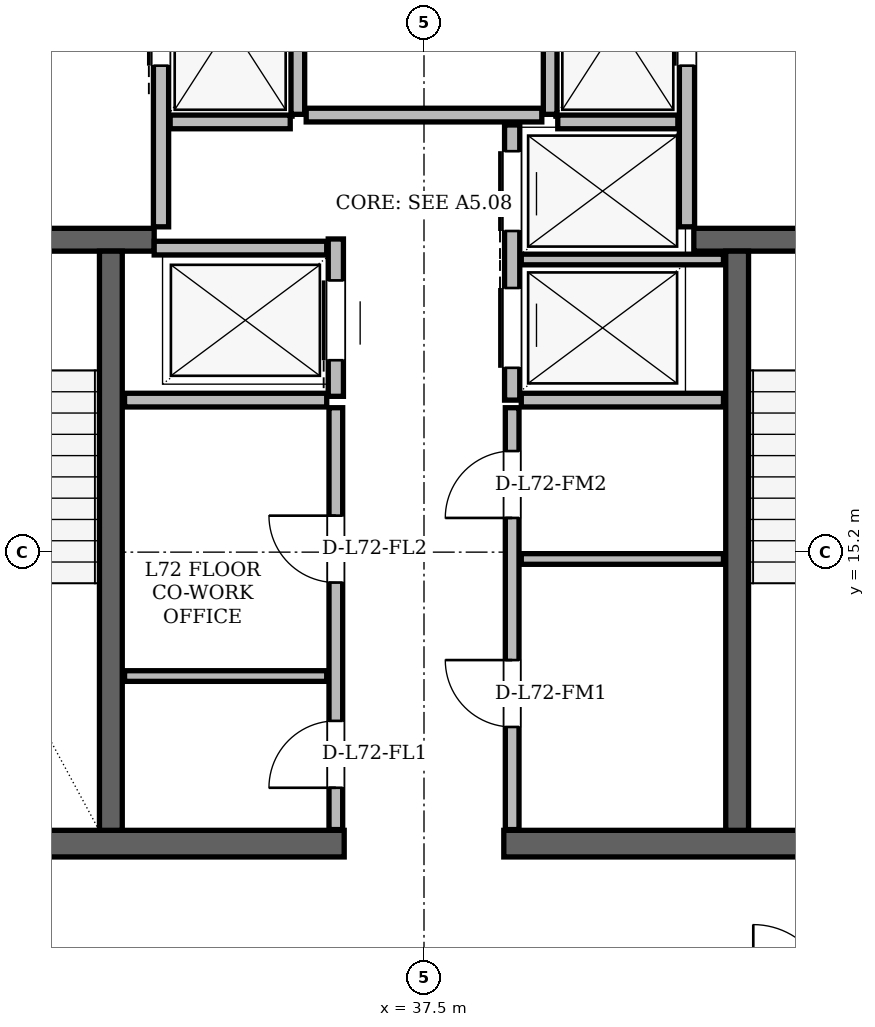
"""IFC4 building model, lengths in metres.
Left out: names, types, materials, properties, quantities, classifications, styles, units other than length and angle.
Written with IfcOpenShell. Run it as: python <this file> out.ifc"""

import sys

from ifc_helpers import new_model, si_unit, direction, frame, frame_2d, origin, place, context, subcontext, project, spatial, rectangle, extrude, element, fill, save


model = new_model("IFC4")
c1 = context("Model", 3, precision=1e-05, world=origin(), true_north=direction((0.0, 1.0)))
c2 = subcontext(c1, "Body", "Model", "MODEL_VIEW")
j1 = project(units=[si_unit("LENGTHUNIT", "METRE"), si_unit("PLANEANGLEUNIT", "RADIAN")], contexts=[c1])
p1 = place(None, origin())
s1 = spatial("IfcSite", under=j1, at=p1, CompositionType="ELEMENT")
p2 = place(p1, origin())
s2 = spatial("IfcBuilding", under=s1, at=p2, CompositionType="ELEMENT")
p3 = place(p2, frame((0.0, 0.0, 273.3)))
s3 = spatial("IfcBuildingStorey", under=s2, at=p3, CompositionType="ELEMENT", Elevation=273.3)
for number, where, z_axis, x_axis in (
    (1, (29.35, 11.365, 0.0), (0.0, 0.0, 1.0), (1.0, 0.0, 0.0)),
    (2, (38.55, 11.365, 0.0), (0.0, 0.0, 1.0), (1.0, 0.0, 0.0)),
):
    element("IfcWall", number, at=place(p3, frame(where, z_axis=z_axis, x_axis=x_axis)), inside=s3, PredefinedType="SHEAR", context=c2, shape_type="SweptSolid", body=[
        extrude(rectangle(XDim=7.1, YDim=0.35, at=frame_2d((3.55, 0.0))), origin(), (0.0, 0.0, 1.0), 3.68),
    ])
p4 = place(p3, frame((29.94, 19.31, 0.0), z_axis=(0.0, 0.0, 1.0), x_axis=(1.0, 0.0, 0.0)))
e3 = element("IfcWall", 3, at=p4, inside=s3, PredefinedType="SHEAR", context=c2, shape_type="SweptSolid", body=[
    extrude(rectangle(XDim=4.01, YDim=0.3, at=frame_2d((2.005, 0.0))), origin(), (0.0, 0.0, 1.0), 3.68),
])
p5 = place(p4, frame((1.01, 0.0, 0.0)))
e4 = element("IfcOpeningElement", 4, at=p5, cuts=e3, PredefinedType="OPENING", context=c2, shape_type="SweptSolid", body=[
    extrude(rectangle(XDim=1.4, YDim=2.2, at=frame_2d((0.7, 1.1))), frame((0.0, 0.15, 0.0), z_axis=(0.0, -1.0, 0.0), x_axis=(1.0, 0.0, 0.0)), (0.0, 0.0, 1.0), 0.3),
])
p6 = place(p3, frame((41.05, 19.31, 0.0), z_axis=(0.0, 0.0, 1.0), x_axis=(1.0, 0.0, 0.0)))
e5 = element("IfcWall", 5, at=p6, inside=s3, PredefinedType="SHEAR", context=c2, shape_type="SweptSolid", body=[
    extrude(rectangle(XDim=4.01, YDim=0.3, at=frame_2d((2.005, 0.0))), origin(), (0.0, 0.0, 1.0), 3.68),
])
p7 = place(p6, frame((1.6, 0.0, 0.0)))
e6 = element("IfcOpeningElement", 6, at=p7, cuts=e5, PredefinedType="OPENING", context=c2, shape_type="SweptSolid", body=[
    extrude(rectangle(XDim=1.4, YDim=2.2, at=frame_2d((0.7, 1.1))), frame((0.0, 0.15, 0.0), z_axis=(0.0, -1.0, 0.0), x_axis=(1.0, 0.0, 0.0)), (0.0, 0.0, 1.0), 0.3),
])
for number, where, z_axis, x_axis in (
    (7, (33.38, 11.54, 0.0), (0.0, 0.0, 1.0), (0.0, 1.0, 0.0)),
    (8, (41.62, 11.54, 0.0), (0.0, 0.0, 1.0), (0.0, 1.0, 0.0)),
):
    element("IfcWall", number, at=place(p3, frame(where, z_axis=z_axis, x_axis=x_axis)), inside=s3, PredefinedType="SHEAR", context=c2, shape_type="SweptSolid", body=[
        extrude(rectangle(XDim=7.62, YDim=0.3, at=frame_2d((3.81, 0.0))), origin(), (0.0, 0.0, 1.0), 3.68),
    ])
p8 = place(p3, frame((58.532, 10.683, 0.0), z_axis=(0.0, 0.0, 1.0), x_axis=(-0.499999381892, 0.866025760649, 0.0)))
e9 = element("IfcWall", 9, at=p8, inside=s3, PredefinedType="SOLIDWALL", context=c2, shape_type="SweptSolid", body=[
    extrude(rectangle(XDim=37.343, YDim=0.29, at=frame_2d((18.671, 0.0))), origin(), (0.0, 0.0, 1.0), 3.058),
])
p9 = place(p8, frame((6.789, 0.0, 0.0)))
e10 = element("IfcOpeningElement", 10, at=p9, cuts=e9, PredefinedType="OPENING", context=c2, shape_type="SweptSolid", body=[
    extrude(rectangle(XDim=1.5, YDim=2.2, at=frame_2d((0.75, 1.1))), frame((0.0, 0.145, 0.0), z_axis=(0.0, -1.0, 0.0), x_axis=(1.0, 0.0, 0.0)), (0.0, 0.0, 1.0), 0.29),
])
p10 = place(p8, frame((27.808, 0.0, 0.0)))
e11 = element("IfcOpeningElement", 11, at=p10, cuts=e9, PredefinedType="OPENING", context=c2, shape_type="SweptSolid", body=[
    extrude(rectangle(XDim=1.5, YDim=2.2, at=frame_2d((0.75, 1.1))), frame((0.0, 0.145, 0.0), z_axis=(0.0, -1.0, 0.0), x_axis=(1.0, 0.0, 0.0)), (0.0, 0.0, 1.0), 0.29),
])
p11 = place(p8, frame((0.901, 0.0, 0.85)))
e12 = element("IfcOpeningElement", 12, at=p11, cuts=e9, PredefinedType="OPENING", context=c2, shape_type="SweptSolid", body=[
    extrude(rectangle(XDim=1.2, YDim=1.48, at=frame_2d((0.6, 0.74))), frame((0.0, 0.145, 0.0), z_axis=(0.0, -1.0, 0.0), x_axis=(1.0, 0.0, 0.0)), (0.0, 0.0, 1.0), 0.29),
])
p12 = place(p8, frame((12.688, 0.0, 0.85)))
e13 = element("IfcOpeningElement", 13, at=p12, cuts=e9, PredefinedType="OPENING", context=c2, shape_type="SweptSolid", body=[
    extrude(rectangle(XDim=3.0, YDim=2.098, at=frame_2d((1.5, 1.049))), frame((0.0, 0.145, 0.0), z_axis=(0.0, -1.0, 0.0), x_axis=(1.0, 0.0, 0.0)), (0.0, 0.0, 1.0), 0.29),
])
p13 = place(p8, frame((17.814, 0.0, 0.85)))
e14 = element("IfcOpeningElement", 14, at=p13, cuts=e9, PredefinedType="OPENING", context=c2, shape_type="SweptSolid", body=[
    extrude(rectangle(XDim=2.6, YDim=1.95, at=frame_2d((1.3, 0.975))), frame((0.0, 0.145, 0.0), z_axis=(0.0, -1.0, 0.0), x_axis=(1.0, 0.0, 0.0)), (0.0, 0.0, 1.0), 0.29),
])
p14 = place(p8, frame((35.362, 0.0, 0.85)))
e15 = element("IfcOpeningElement", 15, at=p14, cuts=e9, PredefinedType="OPENING", context=c2, shape_type="SweptSolid", body=[
    extrude(rectangle(XDim=1.2, YDim=1.48, at=frame_2d((0.6, 0.74))), frame((0.0, 0.145, 0.0), z_axis=(0.0, -1.0, 0.0), x_axis=(1.0, 0.0, 0.0)), (0.0, 0.0, 1.0), 0.29),
])
p15 = place(p8, frame((33.788, 0.0, 0.85)))
e16 = element("IfcOpeningElement", 16, at=p15, cuts=e9, PredefinedType="OPENING", context=c2, shape_type="SweptSolid", body=[
    extrude(rectangle(XDim=1.2, YDim=1.48, at=frame_2d((0.6, 0.74))), frame((0.0, 0.145, 0.0), z_axis=(0.0, -1.0, 0.0), x_axis=(1.0, 0.0, 0.0)), (0.0, 0.0, 1.0), 0.29),
])
p16 = place(p8, frame((22.74, 0.0, 0.85)))
e17 = element("IfcOpeningElement", 17, at=p16, cuts=e9, PredefinedType="OPENING", context=c2, shape_type="SweptSolid", body=[
    extrude(rectangle(XDim=1.2, YDim=1.48, at=frame_2d((0.6, 0.74))), frame((0.0, 0.145, 0.0), z_axis=(0.0, -1.0, 0.0), x_axis=(1.0, 0.0, 0.0)), (0.0, 0.0, 1.0), 0.29),
])
p17 = place(p8, frame((31.705, 0.0, 0.85)))
e18 = element("IfcOpeningElement", 18, at=p17, cuts=e9, PredefinedType="OPENING", context=c2, shape_type="SweptSolid", body=[
    extrude(rectangle(XDim=1.2, YDim=1.48, at=frame_2d((0.6, 0.74))), frame((0.0, 0.145, 0.0), z_axis=(0.0, -1.0, 0.0), x_axis=(1.0, 0.0, 0.0)), (0.0, 0.0, 1.0), 0.29),
])
p18 = place(p3, frame((35.139, 43.023, 0.0), z_axis=(0.0, 0.0, 1.0), x_axis=(-0.499999381892, -0.866025760649, 0.0)))
e19 = element("IfcWall", 19, at=p18, inside=s3, PredefinedType="SOLIDWALL", context=c2, shape_type="SweptSolid", body=[
    extrude(rectangle(XDim=37.343, YDim=0.29, at=frame_2d((18.671, 0.0))), origin(), (0.0, 0.0, 1.0), 3.058),
])
p19 = place(p18, frame((3.639, 0.0, 0.0)))
e20 = element("IfcOpeningElement", 20, at=p19, cuts=e19, PredefinedType="OPENING", context=c2, shape_type="SweptSolid", body=[
    extrude(rectangle(XDim=1.5, YDim=2.2, at=frame_2d((0.75, 1.1))), frame((0.0, 0.145, 0.0), z_axis=(0.0, -1.0, 0.0), x_axis=(1.0, 0.0, 0.0)), (0.0, 0.0, 1.0), 0.29),
])
p20 = place(p18, frame((27.809, 0.0, 0.0)))
e21 = element("IfcOpeningElement", 21, at=p20, cuts=e19, PredefinedType="OPENING", context=c2, shape_type="SweptSolid", body=[
    extrude(rectangle(XDim=1.5, YDim=2.2, at=frame_2d((0.75, 1.1))), frame((0.0, 0.145, 0.0), z_axis=(0.0, -1.0, 0.0), x_axis=(1.0, 0.0, 0.0)), (0.0, 0.0, 1.0), 0.29),
])
p21 = place(p18, frame((22.281, 0.0, 0.85)))
e22 = element("IfcOpeningElement", 22, at=p21, cuts=e19, PredefinedType="OPENING", context=c2, shape_type="SweptSolid", body=[
    extrude(rectangle(XDim=2.6, YDim=1.95, at=frame_2d((1.3, 0.975))), frame((0.0, 0.145, 0.0), z_axis=(0.0, -1.0, 0.0), x_axis=(1.0, 0.0, 0.0)), (0.0, 0.0, 1.0), 0.29),
])
p22 = place(p18, frame((33.866, 0.0, 0.85)))
e23 = element("IfcOpeningElement", 23, at=p22, cuts=e19, PredefinedType="OPENING", context=c2, shape_type="SweptSolid", body=[
    extrude(rectangle(XDim=2.4, YDim=1.9, at=frame_2d((1.2, 0.95))), frame((0.0, 0.145, 0.0), z_axis=(0.0, -1.0, 0.0), x_axis=(1.0, 0.0, 0.0)), (0.0, 0.0, 1.0), 0.29),
])
p23 = place(p18, frame((12.197, 0.0, 0.85)))
e24 = element("IfcOpeningElement", 24, at=p23, cuts=e19, PredefinedType="OPENING", context=c2, shape_type="SweptSolid", body=[
    extrude(rectangle(XDim=1.2, YDim=1.48, at=frame_2d((0.6, 0.74))), frame((0.0, 0.145, 0.0), z_axis=(0.0, -1.0, 0.0), x_axis=(1.0, 0.0, 0.0)), (0.0, 0.0, 1.0), 0.29),
])
p24 = place(p18, frame((16.635, 0.0, 0.85)))
e25 = element("IfcOpeningElement", 25, at=p24, cuts=e19, PredefinedType="OPENING", context=c2, shape_type="SweptSolid", body=[
    extrude(rectangle(XDim=1.6, YDim=1.7, at=frame_2d((0.8, 0.85))), frame((0.0, 0.145, 0.0), z_axis=(0.0, -1.0, 0.0), x_axis=(1.0, 0.0, 0.0)), (0.0, 0.0, 1.0), 0.29),
])
p25 = place(p18, frame((7.001, 0.0, 0.85)))
e26 = element("IfcOpeningElement", 26, at=p25, cuts=e19, PredefinedType="OPENING", context=c2, shape_type="SweptSolid", body=[
    extrude(rectangle(XDim=1.2, YDim=1.48, at=frame_2d((0.6, 0.74))), frame((0.0, 0.145, 0.0), z_axis=(0.0, -1.0, 0.0), x_axis=(1.0, 0.0, 0.0)), (0.0, 0.0, 1.0), 0.29),
])
p26 = place(p3, frame((34.04, 19.48, 0.0), z_axis=(0.0, 0.0, 1.0), x_axis=(0.0, 1.0, 0.0)))
e27 = element("IfcWall", 27, at=p26, inside=s3, PredefinedType="PARTITIONING", context=c2, shape_type="SweptSolid", body=[
    extrude(rectangle(XDim=4.5, YDim=0.2, at=frame_2d((2.25, 0.0))), origin(), (0.0, 0.0, 1.0), 3.68),
])
p27 = place(p26, frame((2.12, 0.0, 0.0)))
e28 = element("IfcOpeningElement", 28, at=p27, cuts=e27, PredefinedType="OPENING", context=c2, shape_type="SweptSolid", body=[
    extrude(rectangle(XDim=1.1, YDim=2.2, at=frame_2d((0.55, 1.1))), frame((0.0, 0.1, 0.0), z_axis=(0.0, -1.0, 0.0), x_axis=(1.0, 0.0, 0.0)), (0.0, 0.0, 1.0), 0.2),
])
p28 = place(p3, frame((35.84, 20.96, 0.0), z_axis=(0.0, 0.0, 1.0), x_axis=(0.0, 1.0, 0.0)))
e29 = element("IfcWall", 29, at=p28, inside=s3, PredefinedType="PARTITIONING", context=c2, shape_type="SweptSolid", body=[
    extrude(rectangle(XDim=3.02, YDim=0.18, at=frame_2d((1.51, 0.0))), origin(), (0.0, 0.0, 1.0), 3.68),
])
p29 = place(p3, frame((34.16, 20.86, 0.0), z_axis=(0.0, 0.0, 1.0), x_axis=(1.0, 0.0, 0.0)))
e30 = element("IfcWall", 30, at=p29, inside=s3, PredefinedType="PARTITIONING", context=c2, shape_type="SweptSolid", body=[
    extrude(rectangle(XDim=1.58, YDim=0.18, at=frame_2d((0.79, 0.0))), origin(), (0.0, 0.0, 1.0), 3.68),
])
p30 = place(p3, frame((40.96, 19.48, 0.0), z_axis=(0.0, 0.0, 1.0), x_axis=(0.0, 1.0, 0.0)))
e31 = element("IfcWall", 31, at=p30, inside=s3, PredefinedType="PARTITIONING", context=c2, shape_type="SweptSolid", body=[
    extrude(rectangle(XDim=4.5, YDim=0.2, at=frame_2d((2.25, 0.0))), origin(), (0.0, 0.0, 1.0), 3.68),
])
p31 = place(p30, frame((2.12, 0.0, 0.0)))
e32 = element("IfcOpeningElement", 32, at=p31, cuts=e31, PredefinedType="OPENING", context=c2, shape_type="SweptSolid", body=[
    extrude(rectangle(XDim=1.1, YDim=2.2, at=frame_2d((0.55, 1.1))), frame((0.0, 0.1, 0.0), z_axis=(0.0, -1.0, 0.0), x_axis=(1.0, 0.0, 0.0)), (0.0, 0.0, 1.0), 0.2),
])
p32 = place(p3, frame((39.16, 20.96, 0.0), z_axis=(0.0, 0.0, 1.0), x_axis=(0.0, 1.0, 0.0)))
e33 = element("IfcWall", 33, at=p32, inside=s3, PredefinedType="PARTITIONING", context=c2, shape_type="SweptSolid", body=[
    extrude(rectangle(XDim=3.02, YDim=0.18, at=frame_2d((1.51, 0.0))), origin(), (0.0, 0.0, 1.0), 3.68),
])
p33 = place(p3, frame((39.26, 20.86, 0.0), z_axis=(0.0, 0.0, 1.0), x_axis=(1.0, 0.0, 0.0)))
e34 = element("IfcWall", 34, at=p33, inside=s3, PredefinedType="PARTITIONING", context=c2, shape_type="SweptSolid", body=[
    extrude(rectangle(XDim=1.58, YDim=0.18, at=frame_2d((0.79, 0.0))), origin(), (0.0, 0.0, 1.0), 3.68),
])
p34 = place(p3, frame((36.34, 17.25, 0.0), z_axis=(0.0, 0.0, 1.0), x_axis=(0.0, 1.0, 0.0)))
e35 = element("IfcWall", 35, at=p34, inside=s3, PredefinedType="PARTITIONING", context=c2, shape_type="SweptSolid", body=[
    extrude(rectangle(XDim=2.07, YDim=0.2, at=frame_2d((1.035, 0.0))), origin(), (0.0, 0.0, 1.0), 3.68),
])
p35 = place(p34, frame((0.475, 0.0, 0.0)))
e36 = element("IfcOpeningElement", 36, at=p35, cuts=e35, PredefinedType="OPENING", context=c2, shape_type="SweptSolid", body=[
    extrude(rectangle(XDim=1.05, YDim=2.15, at=frame_2d((0.525, 1.075))), frame((0.0, 0.1, 0.0), z_axis=(0.0, -1.0, 0.0), x_axis=(1.0, 0.0, 0.0)), (0.0, 0.0, 1.0), 0.2),
])
p36 = place(p3, frame((33.95, 19.2, 0.0), z_axis=(0.0, 0.0, 1.0), x_axis=(1.0, 0.0, 0.0)))
e37 = element("IfcWall", 37, at=p36, inside=s3, PredefinedType="PARTITIONING", context=c2, shape_type="SweptSolid", body=[
    extrude(rectangle(XDim=2.27, YDim=0.18, at=frame_2d((1.135, 0.0))), origin(), (0.0, 0.0, 1.0), 3.68),
])
p37 = place(p3, frame((33.56, 17.2, 0.0), z_axis=(0.0, 0.0, 1.0), x_axis=(1.0, 0.0, 0.0)))
e38 = element("IfcWall", 38, at=p37, inside=s3, PredefinedType="PARTITIONING", context=c2, shape_type="SweptSolid", body=[
    extrude(rectangle(XDim=2.66, YDim=0.18, at=frame_2d((1.33, 0.0))), origin(), (0.0, 0.0, 1.0), 3.68),
])
p38 = place(p3, frame((36.34, 11.55, 0.0), z_axis=(0.0, 0.0, 1.0), x_axis=(0.0, 1.0, 0.0)))
e39 = element("IfcWall", 39, at=p38, inside=s3, PredefinedType="PARTITIONING", context=c2, shape_type="SweptSolid", body=[
    extrude(rectangle(XDim=5.55, YDim=0.18, at=frame_2d((2.775, 0.0))), origin(), (0.0, 0.0, 1.0), 3.68),
])
p39 = place(p38, frame((0.55, 0.0, 0.0)))
e40 = element("IfcOpeningElement", 40, at=p39, cuts=e39, PredefinedType="OPENING", context=c2, shape_type="SweptSolid", body=[
    extrude(rectangle(XDim=0.88, YDim=2.08, at=frame_2d((0.44, 1.04))), frame((0.0, 0.09, 0.0), z_axis=(0.0, -1.0, 0.0), x_axis=(1.0, 0.0, 0.0)), (0.0, 0.0, 1.0), 0.18),
])
p40 = place(p38, frame((3.25, 0.0, 0.0)))
e41 = element("IfcOpeningElement", 41, at=p40, cuts=e39, PredefinedType="OPENING", context=c2, shape_type="SweptSolid", body=[
    extrude(rectangle(XDim=0.88, YDim=2.08, at=frame_2d((0.44, 1.04))), frame((0.0, 0.09, 0.0), z_axis=(0.0, -1.0, 0.0), x_axis=(1.0, 0.0, 0.0)), (0.0, 0.0, 1.0), 0.18),
])
p41 = place(p3, frame((33.56, 13.57, 0.0), z_axis=(0.0, 0.0, 1.0), x_axis=(1.0, 0.0, 0.0)))
e42 = element("IfcWall", 42, at=p41, inside=s3, PredefinedType="PARTITIONING", context=c2, shape_type="SweptSolid", body=[
    extrude(rectangle(XDim=2.66, YDim=0.14, at=frame_2d((1.33, 0.0))), origin(), (0.0, 0.0, 1.0), 3.68),
])
p42 = place(p3, frame((38.66, 17.2, 0.0), z_axis=(0.0, 0.0, 1.0), x_axis=(0.0, 1.0, 0.0)))
e43 = element("IfcWall", 43, at=p42, inside=s3, PredefinedType="PARTITIONING", context=c2, shape_type="SweptSolid", body=[
    extrude(rectangle(XDim=3.62, YDim=0.2, at=frame_2d((1.81, 0.0))), origin(), (0.0, 0.0, 1.0), 3.68),
])
p43 = place(p42, frame((0.425, 0.0, 0.0)))
e44 = element("IfcOpeningElement", 44, at=p43, cuts=e43, PredefinedType="OPENING", context=c2, shape_type="SweptSolid", body=[
    extrude(rectangle(XDim=1.05, YDim=2.15, at=frame_2d((0.525, 1.075))), frame((0.0, 0.1, 0.0), z_axis=(0.0, -1.0, 0.0), x_axis=(1.0, 0.0, 0.0)), (0.0, 0.0, 1.0), 0.2),
])
p44 = place(p42, frame((2.225, 0.0, 0.0)))
e45 = element("IfcOpeningElement", 45, at=p44, cuts=e43, PredefinedType="OPENING", context=c2, shape_type="SweptSolid", body=[
    extrude(rectangle(XDim=1.05, YDim=2.15, at=frame_2d((0.525, 1.075))), frame((0.0, 0.1, 0.0), z_axis=(0.0, -1.0, 0.0), x_axis=(1.0, 0.0, 0.0)), (0.0, 0.0, 1.0), 0.2),
])
p45 = place(p3, frame((38.78, 17.2, 0.0), z_axis=(0.0, 0.0, 1.0), x_axis=(1.0, 0.0, 0.0)))
e46 = element("IfcWall", 46, at=p45, inside=s3, PredefinedType="PARTITIONING", context=c2, shape_type="SweptSolid", body=[
    extrude(rectangle(XDim=2.66, YDim=0.18, at=frame_2d((1.33, 0.0))), origin(), (0.0, 0.0, 1.0), 3.68),
])
p46 = place(p3, frame((38.78, 19.05, 0.0), z_axis=(0.0, 0.0, 1.0), x_axis=(1.0, 0.0, 0.0)))
e47 = element("IfcWall", 47, at=p46, inside=s3, PredefinedType="PARTITIONING", context=c2, shape_type="SweptSolid", body=[
    extrude(rectangle(XDim=2.66, YDim=0.14, at=frame_2d((1.33, 0.0))), origin(), (0.0, 0.0, 1.0), 3.68),
])
p47 = place(p3, frame((38.66, 11.55, 0.0), z_axis=(0.0, 0.0, 1.0), x_axis=(0.0, 1.0, 0.0)))
e48 = element("IfcWall", 48, at=p47, inside=s3, PredefinedType="PARTITIONING", context=c2, shape_type="SweptSolid", body=[
    extrude(rectangle(XDim=5.55, YDim=0.18, at=frame_2d((2.775, 0.0))), origin(), (0.0, 0.0, 1.0), 3.68),
])
p48 = place(p47, frame((1.35, 0.0, 0.0)))
e49 = element("IfcOpeningElement", 49, at=p48, cuts=e48, PredefinedType="OPENING", context=c2, shape_type="SweptSolid", body=[
    extrude(rectangle(XDim=0.88, YDim=2.08, at=frame_2d((0.44, 1.04))), frame((0.0, 0.09, 0.0), z_axis=(0.0, -1.0, 0.0), x_axis=(1.0, 0.0, 0.0)), (0.0, 0.0, 1.0), 0.18),
])
p49 = place(p47, frame((4.1, 0.0, 0.0)))
e50 = element("IfcOpeningElement", 50, at=p49, cuts=e48, PredefinedType="OPENING", context=c2, shape_type="SweptSolid", body=[
    extrude(rectangle(XDim=0.88, YDim=2.08, at=frame_2d((0.44, 1.04))), frame((0.0, 0.09, 0.0), z_axis=(0.0, -1.0, 0.0), x_axis=(1.0, 0.0, 0.0)), (0.0, 0.0, 1.0), 0.18),
])
p50 = place(p3, frame((38.78, 15.11, 0.0), z_axis=(0.0, 0.0, 1.0), x_axis=(1.0, 0.0, 0.0)))
e51 = element("IfcWall", 51, at=p50, inside=s3, PredefinedType="PARTITIONING", context=c2, shape_type="SweptSolid", body=[
    extrude(rectangle(XDim=2.66, YDim=0.14, at=frame_2d((1.33, 0.0))), origin(), (0.0, 0.0, 1.0), 3.68),
])
p51 = place(p3, frame((35.95, 20.95, 0.0), z_axis=(0.0, 0.0, 1.0), x_axis=(1.0, 0.0, 0.0)))
e52 = element("IfcWall", 52, at=p51, inside=s3, PredefinedType="PARTITIONING", context=c2, shape_type="SweptSolid", body=[
    extrude(rectangle(XDim=3.1, YDim=0.18, at=frame_2d((1.55, 0.0))), origin(), (0.0, 0.0, 1.0), 3.68),
])
p52 = place(p39, origin())
e53 = element("IfcDoor", 53, at=p52, inside=s3, OperationType="SINGLE_SWING_LEFT", PredefinedType="DOOR", context=c2, shape_type="SweptSolid", body=[
    extrude(rectangle(XDim=0.88, YDim=2.08, at=frame_2d((0.44, 1.04))), frame((0.0, 0.025, 0.0), z_axis=(0.0, -1.0, 0.0), x_axis=(1.0, 0.0, 0.0)), (0.0, 0.0, 1.0), 0.05),
])
fill(e40, e53)
p53 = place(p40, origin())
e54 = element("IfcDoor", 54, at=p53, inside=s3, OperationType="SINGLE_SWING_RIGHT", PredefinedType="DOOR", context=c2, shape_type="SweptSolid", body=[
    extrude(rectangle(XDim=0.88, YDim=2.08, at=frame_2d((0.44, 1.04))), frame((0.0, 0.025, 0.0), z_axis=(0.0, -1.0, 0.0), x_axis=(1.0, 0.0, 0.0)), (0.0, 0.0, 1.0), 0.05),
])
fill(e41, e54)
p54 = place(p48, origin())
e55 = element("IfcDoor", 55, at=p54, inside=s3, OperationType="SINGLE_SWING_RIGHT", PredefinedType="DOOR", context=c2, shape_type="SweptSolid", body=[
    extrude(rectangle(XDim=0.88, YDim=2.08, at=frame_2d((0.44, 1.04))), frame((0.0, 0.025, 0.0), z_axis=(0.0, -1.0, 0.0), x_axis=(1.0, 0.0, 0.0)), (0.0, 0.0, 1.0), 0.05),
])
fill(e49, e55)
p55 = place(p49, origin())
e56 = element("IfcDoor", 56, at=p55, inside=s3, OperationType="SINGLE_SWING_LEFT", PredefinedType="DOOR", context=c2, shape_type="SweptSolid", body=[
    extrude(rectangle(XDim=0.88, YDim=2.08, at=frame_2d((0.44, 1.04))), frame((0.0, 0.025, 0.0), z_axis=(0.0, -1.0, 0.0), x_axis=(1.0, 0.0, 0.0)), (0.0, 0.0, 1.0), 0.05),
])
fill(e50, e56)
p56 = place(p27, origin())
e57 = element("IfcDoor", 57, at=p56, inside=s3, OperationType="SLIDING_TO_LEFT", PredefinedType="DOOR", context=c2, shape_type="SweptSolid", body=[
    extrude(rectangle(XDim=1.1, YDim=2.2, at=frame_2d((0.55, 1.1))), frame((0.0, 0.025, 0.0), z_axis=(0.0, -1.0, 0.0), x_axis=(1.0, 0.0, 0.0)), (0.0, 0.0, 1.0), 0.05),
])
fill(e28, e57)
p57 = place(p31, origin())
e58 = element("IfcDoor", 58, at=p57, inside=s3, OperationType="SLIDING_TO_RIGHT", PredefinedType="DOOR", context=c2, shape_type="SweptSolid", body=[
    extrude(rectangle(XDim=1.1, YDim=2.2, at=frame_2d((0.55, 1.1))), frame((0.0, 0.025, 0.0), z_axis=(0.0, -1.0, 0.0), x_axis=(1.0, 0.0, 0.0)), (0.0, 0.0, 1.0), 0.05),
])
fill(e32, e58)
p58 = place(p35, origin())
e59 = element("IfcDoor", 59, at=p58, inside=s3, OperationType="SLIDING_TO_LEFT", PredefinedType="DOOR", context=c2, shape_type="SweptSolid", body=[
    extrude(rectangle(XDim=1.05, YDim=2.15, at=frame_2d((0.525, 1.075))), frame((0.0, 0.025, 0.0), z_axis=(0.0, -1.0, 0.0), x_axis=(1.0, 0.0, 0.0)), (0.0, 0.0, 1.0), 0.05),
])
fill(e36, e59)
p59 = place(p43, origin())
e60 = element("IfcDoor", 60, at=p59, inside=s3, OperationType="SLIDING_TO_RIGHT", PredefinedType="DOOR", context=c2, shape_type="SweptSolid", body=[
    extrude(rectangle(XDim=1.05, YDim=2.15, at=frame_2d((0.525, 1.075))), frame((0.0, 0.025, 0.0), z_axis=(0.0, -1.0, 0.0), x_axis=(1.0, 0.0, 0.0)), (0.0, 0.0, 1.0), 0.05),
])
fill(e44, e60)
p60 = place(p44, origin())
e61 = element("IfcDoor", 61, at=p60, inside=s3, OperationType="SLIDING_TO_LEFT", PredefinedType="DOOR", context=c2, shape_type="SweptSolid", body=[
    extrude(rectangle(XDim=1.05, YDim=2.15, at=frame_2d((0.525, 1.075))), frame((0.0, 0.025, 0.0), z_axis=(0.0, -1.0, 0.0), x_axis=(1.0, 0.0, 0.0)), (0.0, 0.0, 1.0), 0.05),
])
fill(e45, e61)
save(model, sys.argv[1])
